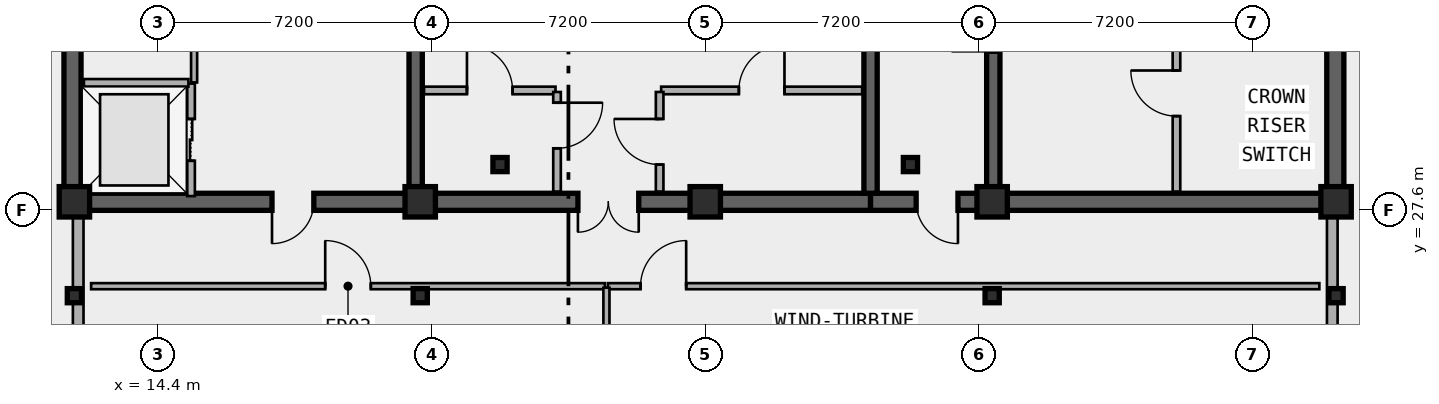
"""IFC4 building model, lengths in metres.
Left out: names, types, materials, properties, quantities, classifications, styles, units other than length and angle.
Written with IfcOpenShell. Run it as: python <this file> out.ifc"""

import sys

from ifc_helpers import new_model, si_unit, direction, frame, frame_2d, origin, origin_2d, place, context, subcontext, project, spatial, rectangle, i_section, extrude, element, fill, save


model = new_model("IFC4")
c1 = context("Model", 3, precision=1e-05, world=origin(), true_north=direction((0.0, 1.0)))
c2 = subcontext(c1, "Body", "Model", "MODEL_VIEW")
j1 = project(units=[si_unit("LENGTHUNIT", "METRE"), si_unit("PLANEANGLEUNIT", "RADIAN")], contexts=[c1])
p1 = place(None, origin())
s1 = spatial("IfcSite", under=j1, at=p1, CompositionType="ELEMENT")
p2 = place(p1, origin())
s2 = spatial("IfcBuilding", under=s1, at=p2, CompositionType="ELEMENT")
p3 = place(p2, frame((0.0, 0.0, 280.6)))
s3 = spatial("IfcBuildingStorey", under=s2, at=p3, CompositionType="ELEMENT", Elevation=280.6)
p4 = place(p3, frame((21.18, 27.82, 0.0), z_axis=(0.0, 0.0, 1.0), x_axis=(-1.0, 0.0, 0.0)))
e1 = element("IfcWall", 1, at=p4, inside=s3, PredefinedType="SHEAR", context=c2, shape_type="SweptSolid", body=[
    extrude(rectangle(XDim=9.03, YDim=0.45, at=frame_2d((4.515, 0.0))), origin(), (0.0, 0.0, 1.0), 6.0),
])
p5 = place(p4, frame((2.68, 0.0, 0.0)))
e2 = element("IfcOpeningElement", 2, at=p5, cuts=e1, PredefinedType="OPENING", context=c2, shape_type="SweptSolid", body=[
    extrude(rectangle(XDim=1.1, YDim=2.15, at=frame_2d((0.55, 1.075))), frame((0.0, 0.235, 0.0), z_axis=(0.0, -1.0, 0.0), x_axis=(1.0, 0.0, 0.0)), (0.0, 0.0, 1.0), 0.47),
])
p6 = place(p3, frame((33.15, 27.82, 0.0), z_axis=(0.0, 0.0, 1.0), x_axis=(-1.0, 0.0, 0.0)))
e3 = element("IfcWall", 3, at=p6, inside=s3, PredefinedType="SHEAR", context=c2, shape_type="SweptSolid", body=[
    extrude(rectangle(XDim=11.97, YDim=0.45, at=frame_2d((5.985, 0.0))), origin(), (0.0, 0.0, 1.0), 6.0),
])
p7 = place(p6, frame((6.1, 0.0, 0.0)))
e4 = element("IfcOpeningElement", 4, at=p7, cuts=e3, PredefinedType="OPENING", context=c2, shape_type="SweptSolid", body=[
    extrude(rectangle(XDim=1.6, YDim=2.2, at=frame_2d((0.8, 1.1))), frame((0.0, 0.235, 0.0), z_axis=(0.0, -1.0, 0.0), x_axis=(1.0, 0.0, 0.0)), (0.0, 0.0, 1.0), 0.47),
])
p8 = place(p3, frame((45.38, 27.82, 0.0), z_axis=(0.0, 0.0, 1.0), x_axis=(-1.0, 0.0, 0.0)))
e5 = element("IfcWall", 5, at=p8, inside=s3, PredefinedType="SHEAR", context=c2, shape_type="SweptSolid", body=[
    extrude(rectangle(XDim=12.23, YDim=0.45, at=frame_2d((6.115, 0.0))), origin(), (0.0, 0.0, 1.0), 6.0),
])
p9 = place(p8, frame((9.93, 0.0, 0.0)))
e6 = element("IfcOpeningElement", 6, at=p9, cuts=e5, PredefinedType="OPENING", context=c2, shape_type="SweptSolid", body=[
    extrude(rectangle(XDim=1.1, YDim=2.15, at=frame_2d((0.55, 1.075))), frame((0.0, 0.235, 0.0), z_axis=(0.0, -1.0, 0.0), x_axis=(1.0, 0.0, 0.0)), (0.0, 0.0, 1.0), 0.47),
])
for number, where, z_axis, x_axis in (
    (7, (12.15, 28.045, 0.0), (0.0, 0.0, 1.0), (0.0, 1.0, 0.0)),
    (8, (45.38, 28.045, 0.0), (0.0, 0.0, 1.0), (0.0, 1.0, 0.0)),
):
    element("IfcWall", number, at=place(p3, frame(where, z_axis=z_axis, x_axis=x_axis)), inside=s3, PredefinedType="SHEAR", context=c2, shape_type="SweptSolid", body=[
        extrude(rectangle(XDim=8.78, YDim=0.45, at=frame_2d((4.39, 0.0))), origin(), (0.0, 0.0, 1.0), 6.0),
    ])
for number, where, z_axis, x_axis in (
    (9, (21.18, 28.045, 0.0), (0.0, 0.0, 1.0), (0.0, 1.0, 0.0)),
    (10, (33.15, 28.045, 0.0), (0.0, 0.0, 1.0), (0.0, 1.0, 0.0)),
):
    element("IfcWall", number, at=place(p3, frame(where, z_axis=z_axis, x_axis=x_axis)), inside=s3, PredefinedType="SHEAR", context=c2, shape_type="SweptSolid", body=[
        extrude(rectangle(XDim=8.78, YDim=0.35, at=frame_2d((4.39, 0.0))), origin(), (0.0, 0.0, 1.0), 6.0),
    ])
p10 = place(p3, frame((36.38, 28.045, 0.0), z_axis=(0.0, 0.0, 1.0), x_axis=(0.0, 1.0, 0.0)))
e11 = element("IfcWall", 11, at=p10, inside=s3, PredefinedType="SHEAR", context=c2, shape_type="SweptSolid", body=[
    extrude(rectangle(XDim=8.78, YDim=0.35, at=frame_2d((4.39, 0.0))), origin(), (0.0, 0.0, 1.0), 6.0),
])
p11 = place(p10, frame((3.735, 0.0, 0.0)))
e12 = element("IfcOpeningElement", 12, at=p11, cuts=e11, PredefinedType="OPENING", context=c2, shape_type="SweptSolid", body=[
    extrude(rectangle(XDim=1.1, YDim=2.15, at=frame_2d((0.55, 1.075))), frame((0.0, 0.185, 0.0), z_axis=(0.0, -1.0, 0.0), x_axis=(1.0, 0.0, 0.0)), (0.0, 0.0, 1.0), 0.37),
])
for number, where, z_axis, x_axis in (
    (13, (23.4, 28.8, 0.0), (0.0, 0.0, 1.0), (1.0, 0.0, 0.0)),
    (14, (34.2, 28.8, 0.0), (0.0, 0.0, 1.0), (1.0, 0.0, 0.0)),
):
    element("IfcColumn", number, at=place(p3, frame(where, z_axis=z_axis, x_axis=x_axis)), inside=s3, PredefinedType="COLUMN", context=c2, shape_type="SweptSolid", body=[
        extrude(i_section(OverallWidth=0.374, OverallDepth=0.372, WebThickness=0.017, FlangeThickness=0.027, FilletRadius=0.015, at=origin_2d()), origin(), (0.0, 0.0, 1.0), 6.0),
    ])
for number, where, z_axis, x_axis in (
    (15, (12.2, 27.82, 0.0), (0.0, 0.0, 1.0), (1.0, 0.0, 0.0)),
    (16, (21.3, 27.82, 0.0), (0.0, 0.0, 1.0), (1.0, 0.0, 0.0)),
    (17, (28.8, 27.82, 0.0), (0.0, 0.0, 1.0), (1.0, 0.0, 0.0)),
    (18, (36.35, 27.82, 0.0), (0.0, 0.0, 1.0), (1.0, 0.0, 0.0)),
    (19, (45.4, 27.82, 0.0), (0.0, 0.0, 1.0), (1.0, 0.0, 0.0)),
):
    element("IfcColumn", number, at=place(p3, frame(where, z_axis=z_axis, x_axis=x_axis)), inside=s3, PredefinedType="COLUMN", context=c2, shape_type="SweptSolid", body=[
        extrude(rectangle(XDim=0.8, YDim=0.8, at=origin_2d()), origin(), (0.0, 0.0, 1.0), 6.0),
    ])
for number, where, z_axis, x_axis in (
    (20, (12.2, 25.35, 0.0), (0.0, 0.0, 1.0), (1.0, 0.0, 0.0)),
    (21, (21.3, 25.35, 0.0), (0.0, 0.0, 1.0), (1.0, 0.0, 0.0)),
    (22, (36.35, 25.35, 0.0), (0.0, 0.0, 1.0), (1.0, 0.0, 0.0)),
    (23, (45.4, 25.35, 0.0), (0.0, 0.0, 1.0), (1.0, 0.0, 0.0)),
):
    element("IfcColumn", number, at=place(p3, frame(where, z_axis=z_axis, x_axis=x_axis)), inside=s3, PredefinedType="COLUMN", context=c2, shape_type="SweptSolid", body=[
        extrude(i_section(OverallWidth=0.374, OverallDepth=0.372, WebThickness=0.017, FlangeThickness=0.027, FilletRadius=0.015, at=origin_2d()), origin(), (0.0, 0.0, 1.0), 6.0),
    ])
for number, where, z_axis, x_axis in (
    (24, (12.3, 21.86, 0.0), (0.0, 0.0, 1.0), (0.0, 1.0, 0.0)),
    (25, (45.3, 27.55, 0.0), (0.0, 0.0, 1.0), (0.0, -1.0, 0.0)),
):
    element("IfcWall", number, at=place(p3, frame(where, z_axis=z_axis, x_axis=x_axis)), inside=s3, PredefinedType="SOLIDWALL", context=c2, shape_type="SweptSolid", body=[
        extrude(rectangle(XDim=5.69, YDim=0.28, at=frame_2d((2.845, 0.0))), origin(), (0.0, 0.0, 1.0), 5.18),
    ])
p12 = place(p3, frame((15.27, 27.97, 0.0), z_axis=(0.0, 0.0, 1.0), x_axis=(0.0, 1.0, 0.0)))
e26 = element("IfcWall", 26, at=p12, inside=s3, PredefinedType="PARTITIONING", context=c2, shape_type="SweptSolid", body=[
    extrude(rectangle(XDim=2.96, YDim=0.2, at=frame_2d((1.48, 0.0))), origin(), (0.0, 0.0, 1.0), 4.77),
])
p13 = place(p12, frame((0.93, 0.0, 0.0)))
e27 = element("IfcOpeningElement", 27, at=p13, cuts=e26, PredefinedType="OPENING", context=c2, shape_type="SweptSolid", body=[
    extrude(rectangle(XDim=1.1, YDim=2.15, at=frame_2d((0.55, 1.075))), frame((0.0, 0.11, 0.0), z_axis=(0.0, -1.0, 0.0), x_axis=(1.0, 0.0, 0.0)), (0.0, 0.0, 1.0), 0.22),
])
p14 = place(p3, frame((12.45, 30.95, 0.0), z_axis=(0.0, 0.0, 1.0), x_axis=(1.0, 0.0, 0.0)))
e28 = element("IfcWall", 28, at=p14, inside=s3, PredefinedType="PARTITIONING", context=c2, shape_type="SweptSolid", body=[
    extrude(rectangle(XDim=2.75, YDim=0.2, at=frame_2d((1.375, 0.0))), origin(), (0.0, 0.0, 1.0), 4.77),
])
p15 = place(p3, frame((41.2, 28.09, 0.0), z_axis=(0.0, 0.0, 1.0), x_axis=(0.0, 1.0, 0.0)))
e29 = element("IfcWall", 29, at=p15, inside=s3, PredefinedType="PARTITIONING", context=c2, shape_type="SweptSolid", body=[
    extrude(rectangle(XDim=5.17, YDim=0.2, at=frame_2d((2.585, 0.0))), origin(), (0.0, 0.0, 1.0), 5.7),
])
p16 = place(p15, frame((1.985, 0.0, 0.0)))
e30 = element("IfcOpeningElement", 30, at=p16, cuts=e29, PredefinedType="OPENING", context=c2, shape_type="SweptSolid", body=[
    extrude(rectangle(XDim=1.2, YDim=2.15, at=frame_2d((0.6, 1.075))), frame((0.0, 0.11, 0.0), z_axis=(0.0, -1.0, 0.0), x_axis=(1.0, 0.0, 0.0)), (0.0, 0.0, 1.0), 0.22),
])
p17 = place(p3, frame((21.4, 30.75, 0.0), z_axis=(0.0, 0.0, 1.0), x_axis=(1.0, 0.0, 0.0)))
e31 = element("IfcWall", 31, at=p17, inside=s3, PredefinedType="PARTITIONING", context=c2, shape_type="SweptSolid", body=[
    extrude(rectangle(XDim=3.46, YDim=0.2, at=frame_2d((1.73, 0.0))), origin(), (0.0, 0.0, 1.0), 4.77),
])
p18 = place(p17, frame((1.13, 0.0, 0.0)))
e32 = element("IfcOpeningElement", 32, at=p18, cuts=e31, PredefinedType="OPENING", context=c2, shape_type="SweptSolid", body=[
    extrude(rectangle(XDim=1.2, YDim=2.15, at=frame_2d((0.6, 1.075))), frame((0.0, 0.11, 0.0), z_axis=(0.0, -1.0, 0.0), x_axis=(1.0, 0.0, 0.0)), (0.0, 0.0, 1.0), 0.22),
])
p19 = place(p3, frame((27.64, 30.75, 0.0), z_axis=(0.0, 0.0, 1.0), x_axis=(1.0, 0.0, 0.0)))
e33 = element("IfcWall", 33, at=p19, inside=s3, PredefinedType="PARTITIONING", context=c2, shape_type="SweptSolid", body=[
    extrude(rectangle(XDim=5.29, YDim=0.2, at=frame_2d((2.645, 0.0))), origin(), (0.0, 0.0, 1.0), 4.77),
])
p20 = place(p19, frame((2.045, 0.0, 0.0)))
e34 = element("IfcOpeningElement", 34, at=p20, cuts=e33, PredefinedType="OPENING", context=c2, shape_type="SweptSolid", body=[
    extrude(rectangle(XDim=1.2, YDim=2.15, at=frame_2d((0.6, 1.075))), frame((0.0, 0.11, 0.0), z_axis=(0.0, -1.0, 0.0), x_axis=(1.0, 0.0, 0.0)), (0.0, 0.0, 1.0), 0.22),
])
p21 = place(p3, frame((24.9, 30.71, 0.0), z_axis=(0.0, 0.0, 1.0), x_axis=(0.0, -1.0, 0.0)))
e35 = element("IfcWall", 35, at=p21, inside=s3, PredefinedType="PARTITIONING", context=c2, shape_type="SweptSolid", body=[
    extrude(rectangle(XDim=2.62, YDim=0.2, at=frame_2d((1.31, 0.0))), origin(), (0.0, 0.0, 1.0), 5.7),
])
p22 = place(p21, frame((0.282, 0.0, 0.0)))
e36 = element("IfcOpeningElement", 36, at=p22, cuts=e35, PredefinedType="OPENING", context=c2, shape_type="SweptSolid", body=[
    extrude(rectangle(XDim=1.2, YDim=2.15, at=frame_2d((0.6, 1.075))), frame((0.0, 0.11, 0.0), z_axis=(0.0, -1.0, 0.0), x_axis=(1.0, 0.0, 0.0)), (0.0, 0.0, 1.0), 0.22),
])
p23 = place(p3, frame((27.6, 28.09, 0.0), z_axis=(0.0, 0.0, 1.0), x_axis=(0.0, 1.0, 0.0)))
e37 = element("IfcWall", 37, at=p23, inside=s3, PredefinedType="PARTITIONING", context=c2, shape_type="SweptSolid", body=[
    extrude(rectangle(XDim=2.62, YDim=0.2, at=frame_2d((1.31, 0.0))), origin(), (0.0, 0.0, 1.0), 5.7),
])
p24 = place(p23, frame((0.71, 0.0, 0.0)))
e38 = element("IfcOpeningElement", 38, at=p24, cuts=e37, PredefinedType="OPENING", context=c2, shape_type="SweptSolid", body=[
    extrude(rectangle(XDim=1.2, YDim=2.15, at=frame_2d((0.6, 1.075))), frame((0.0, 0.11, 0.0), z_axis=(0.0, -1.0, 0.0), x_axis=(1.0, 0.0, 0.0)), (0.0, 0.0, 1.0), 0.22),
])
p25 = place(p3, frame((12.64, 25.6, 0.0), z_axis=(0.0, 0.0, 1.0), x_axis=(1.0, 0.0, 0.0)))
e39 = element("IfcWall", 39, at=p25, inside=s3, PredefinedType="PARTITIONING", context=c2, shape_type="SweptSolid", body=[
    extrude(rectangle(XDim=13.52, YDim=0.16, at=frame_2d((6.76, 0.0))), origin(), (0.0, 0.0, 1.0), 5.18),
])
p26 = place(p25, frame((6.16, 0.0, 0.0)))
e40 = element("IfcOpeningElement", 40, at=p26, cuts=e39, PredefinedType="OPENING", context=c2, shape_type="SweptSolid", body=[
    extrude(rectangle(XDim=1.2, YDim=2.15, at=frame_2d((0.6, 1.075))), frame((0.0, 0.09, 0.0), z_axis=(0.0, -1.0, 0.0), x_axis=(1.0, 0.0, 0.0)), (0.0, 0.0, 1.0), 0.18),
])
p27 = place(p3, frame((26.24, 25.6, 0.0), z_axis=(0.0, 0.0, 1.0), x_axis=(1.0, 0.0, 0.0)))
e41 = element("IfcWall", 41, at=p27, inside=s3, PredefinedType="PARTITIONING", context=c2, shape_type="SweptSolid", body=[
    extrude(rectangle(XDim=18.72, YDim=0.16, at=frame_2d((9.36, 0.0))), origin(), (0.0, 0.0, 1.0), 5.18),
])
p28 = place(p27, frame((0.858, 0.0, 0.0)))
e42 = element("IfcOpeningElement", 42, at=p28, cuts=e41, PredefinedType="OPENING", context=c2, shape_type="SweptSolid", body=[
    extrude(rectangle(XDim=1.2, YDim=2.15, at=frame_2d((0.6, 1.075))), frame((0.0, 0.09, 0.0), z_axis=(0.0, -1.0, 0.0), x_axis=(1.0, 0.0, 0.0)), (0.0, 0.0, 1.0), 0.18),
])
p29 = place(p3, frame((26.2, 22.24, 0.0), z_axis=(0.0, 0.0, 1.0), x_axis=(0.0, 1.0, 0.0)))
e43 = element("IfcWall", 43, at=p29, inside=s3, PredefinedType="PARTITIONING", context=c2, shape_type="SweptSolid", body=[
    extrude(rectangle(XDim=3.32, YDim=0.16, at=frame_2d((1.66, 0.0))), origin(), (0.0, 0.0, 1.0), 5.32),
])
p30 = place(p3, frame((15.35, 30.96, 0.0), z_axis=(0.0, 0.0, 1.0), x_axis=(0.0, 1.0, 0.0)))
e44 = element("IfcWall", 44, at=p30, inside=s3, PredefinedType="PARTITIONING", context=c2, shape_type="SweptSolid", body=[
    extrude(rectangle(XDim=2.31, YDim=0.16, at=frame_2d((1.155, 0.0))), origin(), (0.0, 0.0, 1.0), 5.7),
])
p31 = place(p13, origin())
e45 = element("IfcDoor", 45, at=p31, inside=s3, OperationType="DOUBLE_DOOR_SLIDING", PredefinedType="DOOR", context=c2, shape_type="SweptSolid", body=[
    extrude(rectangle(XDim=1.1, YDim=2.15, at=frame_2d((0.55, 1.075))), frame((0.0, 0.025, 0.0), z_axis=(0.0, -1.0, 0.0), x_axis=(1.0, 0.0, 0.0)), (0.0, 0.0, 1.0), 0.05),
])
fill(e27, e45)
p32 = place(p5, origin())
e46 = element("IfcDoor", 46, at=p32, inside=s3, OperationType="SINGLE_SWING_RIGHT", PredefinedType="DOOR", context=c2, shape_type="SweptSolid", body=[
    extrude(rectangle(XDim=1.1, YDim=2.15, at=frame_2d((0.55, 1.075))), frame((0.0, 0.025, 0.0), z_axis=(0.0, -1.0, 0.0), x_axis=(1.0, 0.0, 0.0)), (0.0, 0.0, 1.0), 0.05),
])
fill(e2, e46)
p33 = place(p9, origin())
e47 = element("IfcDoor", 47, at=p33, inside=s3, OperationType="SINGLE_SWING_LEFT", PredefinedType="DOOR", context=c2, shape_type="SweptSolid", body=[
    extrude(rectangle(XDim=1.1, YDim=2.15, at=frame_2d((0.55, 1.075))), frame((0.0, 0.025, 0.0), z_axis=(0.0, -1.0, 0.0), x_axis=(1.0, 0.0, 0.0)), (0.0, 0.0, 1.0), 0.05),
])
fill(e6, e47)
p34 = place(p7, origin())
e48 = element("IfcDoor", 48, at=p34, inside=s3, OperationType="SINGLE_SWING_LEFT", PredefinedType="DOOR", context=c2, shape_type="SweptSolid", body=[
    extrude(rectangle(XDim=1.6, YDim=2.2, at=frame_2d((0.8, 1.1))), frame((0.0, 0.025, 0.0), z_axis=(0.0, -1.0, 0.0), x_axis=(1.0, 0.0, 0.0)), (0.0, 0.0, 1.0), 0.05),
])
fill(e4, e48)
p35 = place(p16, origin())
e49 = element("IfcDoor", 49, at=p35, inside=s3, OperationType="SINGLE_SWING_RIGHT", PredefinedType="DOOR", context=c2, shape_type="SweptSolid", body=[
    extrude(rectangle(XDim=1.2, YDim=2.15, at=frame_2d((0.6, 1.075))), frame((0.0, 0.025, 0.0), z_axis=(0.0, -1.0, 0.0), x_axis=(1.0, 0.0, 0.0)), (0.0, 0.0, 1.0), 0.05),
])
fill(e30, e49)
p36 = place(p18, origin())
e50 = element("IfcDoor", 50, at=p36, inside=s3, OperationType="SINGLE_SWING_LEFT", PredefinedType="DOOR", context=c2, shape_type="SweptSolid", body=[
    extrude(rectangle(XDim=1.2, YDim=2.15, at=frame_2d((0.6, 1.075))), frame((0.0, 0.025, 0.0), z_axis=(0.0, -1.0, 0.0), x_axis=(1.0, 0.0, 0.0)), (0.0, 0.0, 1.0), 0.05),
])
fill(e32, e50)
p37 = place(p20, origin())
e51 = element("IfcDoor", 51, at=p37, inside=s3, OperationType="SINGLE_SWING_RIGHT", PredefinedType="DOOR", context=c2, shape_type="SweptSolid", body=[
    extrude(rectangle(XDim=1.2, YDim=2.15, at=frame_2d((0.6, 1.075))), frame((0.0, 0.025, 0.0), z_axis=(0.0, -1.0, 0.0), x_axis=(1.0, 0.0, 0.0)), (0.0, 0.0, 1.0), 0.05),
])
fill(e34, e51)
p38 = place(p22, origin())
e52 = element("IfcDoor", 52, at=p38, inside=s3, OperationType="SINGLE_SWING_LEFT", PredefinedType="DOOR", context=c2, shape_type="SweptSolid", body=[
    extrude(rectangle(XDim=1.2, YDim=2.15, at=frame_2d((0.6, 1.075))), frame((0.0, 0.025, 0.0), z_axis=(0.0, -1.0, 0.0), x_axis=(1.0, 0.0, 0.0)), (0.0, 0.0, 1.0), 0.05),
])
fill(e36, e52)
p39 = place(p24, origin())
e53 = element("IfcDoor", 53, at=p39, inside=s3, OperationType="SINGLE_SWING_RIGHT", PredefinedType="DOOR", context=c2, shape_type="SweptSolid", body=[
    extrude(rectangle(XDim=1.2, YDim=2.15, at=frame_2d((0.6, 1.075))), frame((0.0, 0.025, 0.0), z_axis=(0.0, -1.0, 0.0), x_axis=(1.0, 0.0, 0.0)), (0.0, 0.0, 1.0), 0.05),
])
fill(e38, e53)
p40 = place(p26, origin())
e54 = element("IfcDoor", 54, at=p40, inside=s3, OperationType="SINGLE_SWING_LEFT", PredefinedType="DOOR", context=c2, shape_type="SweptSolid", body=[
    extrude(rectangle(XDim=1.2, YDim=2.15, at=frame_2d((0.6, 1.075))), frame((0.0, 0.025, 0.0), z_axis=(0.0, -1.0, 0.0), x_axis=(1.0, 0.0, 0.0)), (0.0, 0.0, 1.0), 0.05),
])
fill(e40, e54)
p41 = place(p28, origin())
e55 = element("IfcDoor", 55, at=p41, inside=s3, OperationType="SINGLE_SWING_RIGHT", PredefinedType="DOOR", context=c2, shape_type="SweptSolid", body=[
    extrude(rectangle(XDim=1.2, YDim=2.15, at=frame_2d((0.6, 1.075))), frame((0.0, 0.025, 0.0), z_axis=(0.0, -1.0, 0.0), x_axis=(1.0, 0.0, 0.0)), (0.0, 0.0, 1.0), 0.05),
])
fill(e42, e55)
save(model, sys.argv[1])
